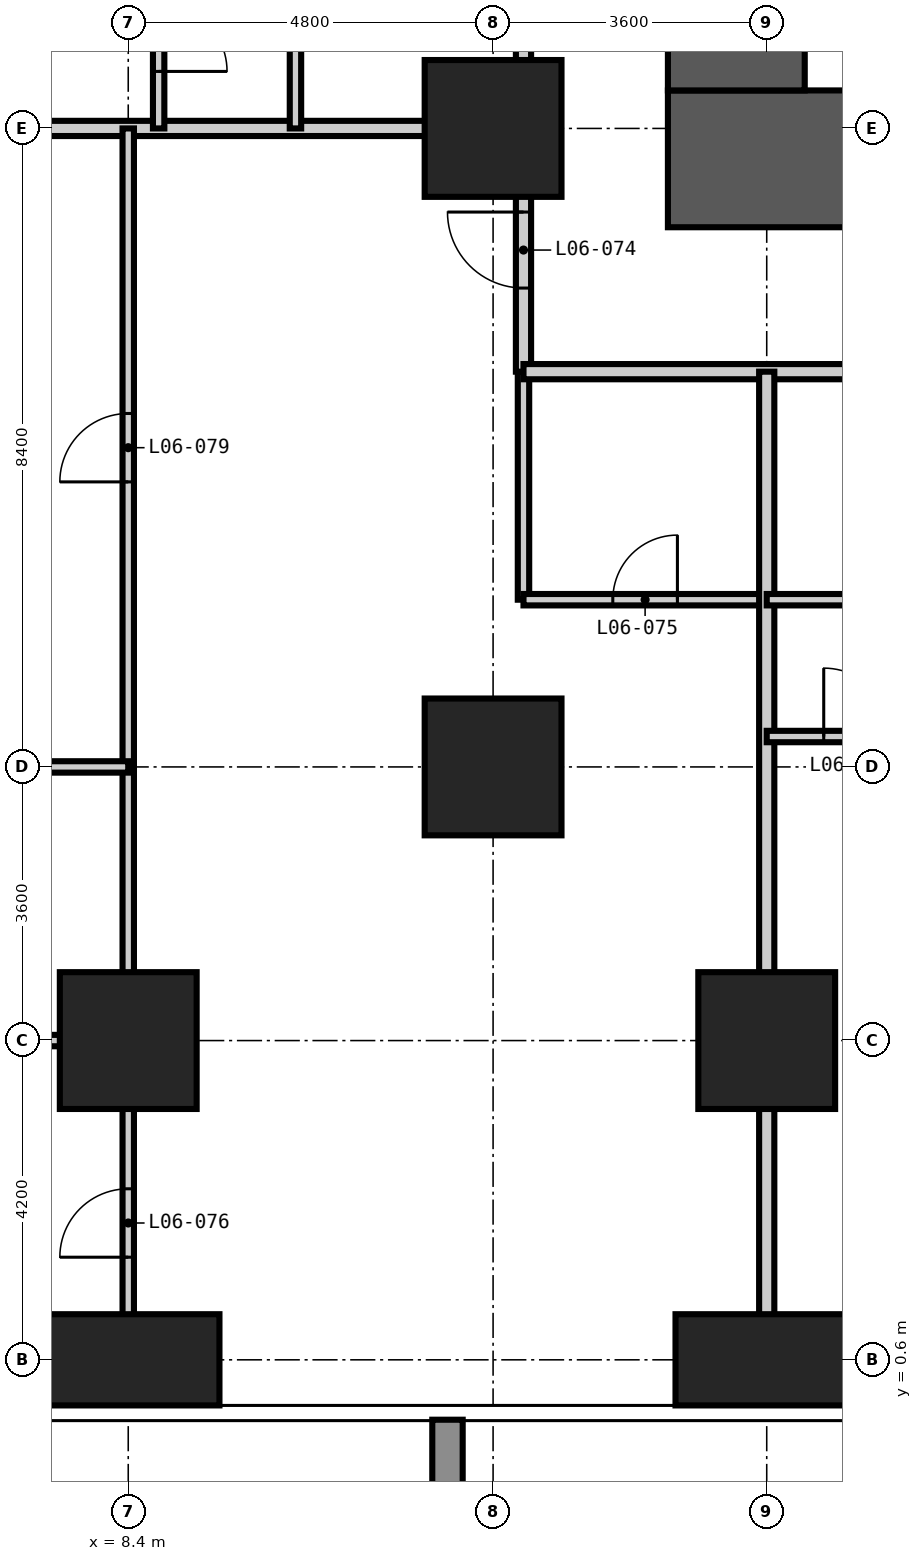
"""IFC4 building model, lengths in metres.
Left out: names, types, materials, properties, quantities, classifications, styles, units other than length and angle.
Written with IfcOpenShell. Run it as: python <this file> out.ifc"""

import sys

from ifc_helpers import new_model, si_unit, direction, frame, frame_2d, origin, origin_2d, place, context, subcontext, project, spatial, rectangle, extrude, element, fill, save


model = new_model("IFC4")
c1 = context("Model", 3, precision=1e-05, world=origin(), true_north=direction((0.0, 1.0)))
c2 = subcontext(c1, "Body", "Model", "MODEL_VIEW")
j1 = project(units=[si_unit("LENGTHUNIT", "METRE"), si_unit("PLANEANGLEUNIT", "RADIAN")], contexts=[c1])
p1 = place(None, origin())
s1 = spatial("IfcSite", under=j1, at=p1, CompositionType="ELEMENT")
p2 = place(p1, origin())
s2 = spatial("IfcBuilding", under=s1, at=p2, CompositionType="ELEMENT")
p3 = place(p2, frame((0.0, 0.0, 30.6)))
s3 = spatial("IfcBuildingStorey", under=s2, at=p3, CompositionType="ELEMENT", Elevation=30.6)
p4 = place(p3, frame((8.4, 0.6, -0.35), z_axis=(0.0, 0.0, 1.0), x_axis=(1.0, 0.0, 0.0)))
e1 = element("IfcColumn", 1, at=p4, inside=s3, PredefinedType="COLUMN", context=c2, shape_type="SweptSolid", body=[
    extrude(rectangle(XDim=2.4, YDim=1.2, at=origin_2d()), origin(), (0.0, 0.0, 1.0), 3.6),
])
for number, where, z_axis, x_axis in (
    (2, (8.4, 4.8, -0.35), (0.0, 0.0, 1.0), (1.0, 0.0, 0.0)),
    (3, (13.2, 8.4, -0.35), (0.0, 0.0, 1.0), (1.0, 0.0, 0.0)),
    (4, (13.2, 16.8, -0.35), (0.0, 0.0, 1.0), (1.0, 0.0, 0.0)),
):
    element("IfcColumn", number, at=place(p3, frame(where, z_axis=z_axis, x_axis=x_axis)), inside=s3, PredefinedType="COLUMN", context=c2, shape_type="SweptSolid", body=[
        extrude(rectangle(XDim=1.8, YDim=1.8, at=origin_2d()), origin(), (0.0, 0.0, 1.0), 3.6),
    ])
p5 = place(p3, frame((16.8, 0.6, -0.35), z_axis=(0.0, 0.0, 1.0), x_axis=(1.0, 0.0, 0.0)))
e5 = element("IfcColumn", 5, at=p5, inside=s3, PredefinedType="COLUMN", context=c2, shape_type="SweptSolid", body=[
    extrude(rectangle(XDim=2.4, YDim=1.2, at=origin_2d()), origin(), (0.0, 0.0, 1.0), 3.6),
])
p6 = place(p3, frame((16.8, 4.8, -0.35), z_axis=(0.0, 0.0, 1.0), x_axis=(1.0, 0.0, 0.0)))
e6 = element("IfcColumn", 6, at=p6, inside=s3, PredefinedType="COLUMN", context=c2, shape_type="SweptSolid", body=[
    extrude(rectangle(XDim=1.8, YDim=1.8, at=origin_2d()), origin(), (0.0, 0.0, 1.0), 3.6),
])
p7 = place(p3, frame((15.5, 16.4, -0.35), z_axis=(0.0, 0.0, 1.0), x_axis=(1.0, 0.0, 0.0)))
e7 = element("IfcWall", 7, at=p7, inside=s3, PredefinedType="SHEAR", context=c2, shape_type="SweptSolid", body=[
    extrude(rectangle(XDim=27.8, YDim=1.8, at=frame_2d((13.9, 0.0))), origin(), (0.0, 0.0, 1.0), 3.6),
])
p8 = place(p7, frame((13.4, 0.0, 0.35)))
e8 = element("IfcOpeningElement", 8, at=p8, cuts=e7, PredefinedType="OPENING", context=c2, shape_type="SweptSolid", body=[
    extrude(rectangle(XDim=1.0, YDim=2.1, at=frame_2d((0.5, 1.05))), frame((0.0, 0.91, 0.0), z_axis=(0.0, -1.0, 0.0), x_axis=(1.0, 0.0, 0.0)), (0.0, 0.0, 1.0), 1.82),
])
p9 = place(p7, frame((19.7, 0.0, 0.35)))
e9 = element("IfcOpeningElement", 9, at=p9, cuts=e7, PredefinedType="OPENING", context=c2, shape_type="SweptSolid", body=[
    extrude(rectangle(XDim=1.0, YDim=2.1, at=frame_2d((0.5, 1.05))), frame((0.0, 0.91, 0.0), z_axis=(0.0, -1.0, 0.0), x_axis=(1.0, 0.0, 0.0)), (0.0, 0.0, 1.0), 1.82),
])
p10 = place(p3, frame((16.4, 41.5, -0.35), z_axis=(0.0, 0.0, 1.0), x_axis=(0.0, -1.0, 0.0)))
e10 = element("IfcWall", 10, at=p10, inside=s3, PredefinedType="SHEAR", context=c2, shape_type="SweptSolid", body=[
    extrude(rectangle(XDim=24.2, YDim=1.8, at=frame_2d((12.1, 0.0))), origin(), (0.0, 0.0, 1.0), 3.6),
])
p11 = place(p10, frame((11.2, 0.0, 0.35)))
e11 = element("IfcOpeningElement", 11, at=p11, cuts=e10, PredefinedType="OPENING", context=c2, shape_type="SweptSolid", body=[
    extrude(rectangle(XDim=1.8, YDim=2.2, at=frame_2d((0.9, 1.1))), frame((0.0, 0.91, 0.0), z_axis=(0.0, -1.0, 0.0), x_axis=(1.0, 0.0, 0.0)), (0.0, 0.0, 1.0), 1.82),
])
p12 = place(p10, frame((20.0, 0.0, 0.35)))
e12 = element("IfcOpeningElement", 12, at=p12, cuts=e10, PredefinedType="OPENING", context=c2, shape_type="SweptSolid", body=[
    extrude(rectangle(XDim=1.0, YDim=2.1, at=frame_2d((0.5, 1.05))), frame((0.0, 0.91, 0.0), z_axis=(0.0, -1.0, 0.0), x_axis=(1.0, 0.0, 0.0)), (0.0, 0.0, 1.0), 1.82),
])
p13 = place(p10, frame((5.3, 0.0, 0.35)))
e13 = element("IfcOpeningElement", 13, at=p13, cuts=e10, PredefinedType="OPENING", context=c2, shape_type="SweptSolid", body=[
    extrude(rectangle(XDim=1.0, YDim=2.1, at=frame_2d((0.5, 1.05))), frame((0.0, 0.91, 0.0), z_axis=(0.0, -1.0, 0.0), x_axis=(1.0, 0.0, 0.0)), (0.0, 0.0, 1.0), 1.82),
])
for number, where, z_axis, x_axis in (
    (14, (13.6, 10.6, 0.0), (0.0, 0.0, 1.0), (0.0, 1.0, 0.0)),
    (15, (5.4, 4.8, 0.0), (0.0, 0.0, 1.0), (1.0, 0.0, 0.0)),
):
    element("IfcWall", number, at=place(p3, frame(where, z_axis=z_axis, x_axis=x_axis)), inside=s3, PredefinedType="PARTITIONING", context=c2, shape_type="SweptSolid", body=[
        extrude(rectangle(XDim=3.0, YDim=0.15, at=frame_2d((1.5, 0.0))), origin(), (0.0, 0.0, 1.0), 3.25),
    ])
p14 = place(p3, frame((13.6, 10.6, 0.0), z_axis=(0.0, 0.0, 1.0), x_axis=(1.0, 0.0, 0.0)))
e16 = element("IfcWall", 16, at=p14, inside=s3, PredefinedType="PARTITIONING", context=c2, shape_type="SweptSolid", body=[
    extrude(rectangle(XDim=3.2, YDim=0.15, at=frame_2d((1.6, 0.0))), origin(), (0.0, 0.0, 1.0), 3.25),
])
p15 = place(p14, frame((1.175, 0.0, 0.0)))
e17 = element("IfcOpeningElement", 17, at=p15, cuts=e16, PredefinedType="OPENING", context=c2, shape_type="SweptSolid", body=[
    extrude(rectangle(XDim=0.85, YDim=2.1, at=frame_2d((0.425, 1.05))), frame((0.0, 0.085, 0.0), z_axis=(0.0, -1.0, 0.0), x_axis=(1.0, 0.0, 0.0)), (0.0, 0.0, 1.0), 0.17),
])
p16 = place(p3, frame((13.6, 13.6, 0.0), z_axis=(0.0, 0.0, 1.0), x_axis=(0.0, 1.0, 0.0)))
e18 = element("IfcWall", 18, at=p16, inside=s3, PredefinedType="PARTITIONING", context=c2, shape_type="SweptSolid", body=[
    extrude(rectangle(XDim=20.0, YDim=0.2, at=frame_2d((10.0, 0.0))), origin(), (0.0, 0.0, 1.0), 3.25),
])
p17 = place(p16, frame((6.0, 0.0, 0.0)))
e19 = element("IfcOpeningElement", 19, at=p17, cuts=e18, PredefinedType="OPENING", context=c2, shape_type="SweptSolid", body=[
    extrude(rectangle(XDim=1.0, YDim=2.2, at=frame_2d((0.5, 1.1))), frame((0.0, 0.11, 0.0), z_axis=(0.0, -1.0, 0.0), x_axis=(1.0, 0.0, 0.0)), (0.0, 0.0, 1.0), 0.22),
])
p18 = place(p16, frame((7.8, 0.0, 0.0)))
e20 = element("IfcOpeningElement", 20, at=p18, cuts=e18, PredefinedType="OPENING", context=c2, shape_type="SweptSolid", body=[
    extrude(rectangle(XDim=1.0, YDim=2.2, at=frame_2d((0.5, 1.1))), frame((0.0, 0.11, 0.0), z_axis=(0.0, -1.0, 0.0), x_axis=(1.0, 0.0, 0.0)), (0.0, 0.0, 1.0), 0.22),
])
p19 = place(p16, frame((14.4, 0.0, 0.0)))
e21 = element("IfcOpeningElement", 21, at=p19, cuts=e18, PredefinedType="OPENING", context=c2, shape_type="SweptSolid", body=[
    extrude(rectangle(XDim=1.0, YDim=2.2, at=frame_2d((0.5, 1.1))), frame((0.0, 0.11, 0.0), z_axis=(0.0, -1.0, 0.0), x_axis=(1.0, 0.0, 0.0)), (0.0, 0.0, 1.0), 0.22),
])
p20 = place(p16, frame((16.2, 0.0, 0.0)))
e22 = element("IfcOpeningElement", 22, at=p20, cuts=e18, PredefinedType="OPENING", context=c2, shape_type="SweptSolid", body=[
    extrude(rectangle(XDim=1.0, YDim=2.2, at=frame_2d((0.5, 1.1))), frame((0.0, 0.11, 0.0), z_axis=(0.0, -1.0, 0.0), x_axis=(1.0, 0.0, 0.0)), (0.0, 0.0, 1.0), 0.22),
])
p21 = place(p16, frame((1.1, 0.0, 0.0)))
e23 = element("IfcOpeningElement", 23, at=p21, cuts=e18, PredefinedType="OPENING", context=c2, shape_type="SweptSolid", body=[
    extrude(rectangle(XDim=1.0, YDim=2.2, at=frame_2d((0.5, 1.1))), frame((0.0, 0.11, 0.0), z_axis=(0.0, -1.0, 0.0), x_axis=(1.0, 0.0, 0.0)), (0.0, 0.0, 1.0), 0.22),
])
p22 = place(p3, frame((45.5, 13.6, 0.0), z_axis=(0.0, 0.0, 1.0), x_axis=(-1.0, 0.0, 0.0)))
e24 = element("IfcWall", 24, at=p22, inside=s3, PredefinedType="PARTITIONING", context=c2, shape_type="SweptSolid", body=[
    extrude(rectangle(XDim=31.9, YDim=0.2, at=frame_2d((15.95, 0.0))), origin(), (0.0, 0.0, 1.0), 3.25),
])
p23 = place(p22, frame((24.9, 0.0, 0.0)))
e25 = element("IfcOpeningElement", 25, at=p23, cuts=e24, PredefinedType="OPENING", context=c2, shape_type="SweptSolid", body=[
    extrude(rectangle(XDim=1.0, YDim=2.2, at=frame_2d((0.5, 1.1))), frame((0.0, 0.11, 0.0), z_axis=(0.0, -1.0, 0.0), x_axis=(1.0, 0.0, 0.0)), (0.0, 0.0, 1.0), 0.22),
])
p24 = place(p22, frame((23.1, 0.0, 0.0)))
e26 = element("IfcOpeningElement", 26, at=p24, cuts=e24, PredefinedType="OPENING", context=c2, shape_type="SweptSolid", body=[
    extrude(rectangle(XDim=1.0, YDim=2.2, at=frame_2d((0.5, 1.1))), frame((0.0, 0.11, 0.0), z_axis=(0.0, -1.0, 0.0), x_axis=(1.0, 0.0, 0.0)), (0.0, 0.0, 1.0), 0.22),
])
p25 = place(p22, frame((16.5, 0.0, 0.0)))
e27 = element("IfcOpeningElement", 27, at=p25, cuts=e24, PredefinedType="OPENING", context=c2, shape_type="SweptSolid", body=[
    extrude(rectangle(XDim=1.0, YDim=2.2, at=frame_2d((0.5, 1.1))), frame((0.0, 0.11, 0.0), z_axis=(0.0, -1.0, 0.0), x_axis=(1.0, 0.0, 0.0)), (0.0, 0.0, 1.0), 0.22),
])
p26 = place(p22, frame((14.7, 0.0, 0.0)))
e28 = element("IfcOpeningElement", 28, at=p26, cuts=e24, PredefinedType="OPENING", context=c2, shape_type="SweptSolid", body=[
    extrude(rectangle(XDim=1.0, YDim=2.2, at=frame_2d((0.5, 1.1))), frame((0.0, 0.11, 0.0), z_axis=(0.0, -1.0, 0.0), x_axis=(1.0, 0.0, 0.0)), (0.0, 0.0, 1.0), 0.22),
])
p27 = place(p22, frame((8.1, 0.0, 0.0)))
e29 = element("IfcOpeningElement", 29, at=p27, cuts=e24, PredefinedType="OPENING", context=c2, shape_type="SweptSolid", body=[
    extrude(rectangle(XDim=1.0, YDim=2.2, at=frame_2d((0.5, 1.1))), frame((0.0, 0.11, 0.0), z_axis=(0.0, -1.0, 0.0), x_axis=(1.0, 0.0, 0.0)), (0.0, 0.0, 1.0), 0.22),
])
p28 = place(p22, frame((6.3, 0.0, 0.0)))
e30 = element("IfcOpeningElement", 30, at=p28, cuts=e24, PredefinedType="OPENING", context=c2, shape_type="SweptSolid", body=[
    extrude(rectangle(XDim=1.0, YDim=2.2, at=frame_2d((0.5, 1.1))), frame((0.0, 0.11, 0.0), z_axis=(0.0, -1.0, 0.0), x_axis=(1.0, 0.0, 0.0)), (0.0, 0.0, 1.0), 0.22),
])
for number, where, z_axis, x_axis in (
    (31, (16.8, -0.008, 0.0), (0.0, 0.0, 1.0), (0.0, 1.0, 0.0)),
    (32, (-0.008, 16.8, 0.0), (0.0, 0.0, 1.0), (1.0, 0.0, 0.0)),
):
    element("IfcWall", number, at=place(p3, frame(where, z_axis=z_axis, x_axis=x_axis)), inside=s3, PredefinedType="PARTITIONING", context=c2, shape_type="SweptSolid", body=[
        extrude(rectangle(XDim=13.608, YDim=0.2, at=frame_2d((6.804, 0.0))), origin(), (0.0, 0.0, 1.0), 3.25),
    ])
p29 = place(p3, frame((8.4, -0.008, 0.0), z_axis=(0.0, 0.0, 1.0), x_axis=(0.0, 1.0, 0.0)))
e33 = element("IfcWall", 33, at=p29, inside=s3, PredefinedType="PARTITIONING", context=c2, shape_type="SweptSolid", body=[
    extrude(rectangle(XDim=16.808, YDim=0.15, at=frame_2d((8.404, 0.0))), origin(), (0.0, 0.0, 1.0), 3.25),
])
p30 = place(p29, frame((1.958, 0.0, 0.0)))
e34 = element("IfcOpeningElement", 34, at=p30, cuts=e33, PredefinedType="OPENING", context=c2, shape_type="SweptSolid", body=[
    extrude(rectangle(XDim=0.9, YDim=2.1, at=frame_2d((0.45, 1.05))), frame((0.0, 0.085, 0.0), z_axis=(0.0, -1.0, 0.0), x_axis=(1.0, 0.0, 0.0)), (0.0, 0.0, 1.0), 0.17),
])
p31 = place(p29, frame((12.158, 0.0, 0.0)))
e35 = element("IfcOpeningElement", 35, at=p31, cuts=e33, PredefinedType="OPENING", context=c2, shape_type="SweptSolid", body=[
    extrude(rectangle(XDim=0.9, YDim=2.1, at=frame_2d((0.45, 1.05))), frame((0.0, 0.085, 0.0), z_axis=(0.0, -1.0, 0.0), x_axis=(1.0, 0.0, 0.0)), (0.0, 0.0, 1.0), 0.17),
])
p32 = place(p3, frame((8.8, 16.8, 0.0), z_axis=(0.0, 0.0, 1.0), x_axis=(0.0, 1.0, 0.0)))
e36 = element("IfcWall", 36, at=p32, inside=s3, PredefinedType="PARTITIONING", context=c2, shape_type="SweptSolid", body=[
    extrude(rectangle(XDim=2.4, YDim=0.15, at=frame_2d((1.2, 0.0))), origin(), (0.0, 0.0, 1.0), 3.25),
])
p33 = place(p32, frame((0.75, 0.0, 0.0)))
e37 = element("IfcOpeningElement", 37, at=p33, cuts=e36, PredefinedType="OPENING", context=c2, shape_type="SweptSolid", body=[
    extrude(rectangle(XDim=0.9, YDim=2.1, at=frame_2d((0.45, 1.05))), frame((0.0, 0.085, 0.0), z_axis=(0.0, -1.0, 0.0), x_axis=(1.0, 0.0, 0.0)), (0.0, 0.0, 1.0), 0.17),
])
p34 = place(p3, frame((10.6, 16.8, 0.0), z_axis=(0.0, 0.0, 1.0), x_axis=(0.0, 1.0, 0.0)))
e38 = element("IfcWall", 38, at=p34, inside=s3, PredefinedType="PARTITIONING", context=c2, shape_type="SweptSolid", body=[
    extrude(rectangle(XDim=2.4, YDim=0.15, at=frame_2d((1.2, 0.0))), origin(), (0.0, 0.0, 1.0), 3.25),
])
p35 = place(p3, frame((-0.008, 8.4, 0.0), z_axis=(0.0, 0.0, 1.0), x_axis=(1.0, 0.0, 0.0)))
e39 = element("IfcWall", 39, at=p35, inside=s3, PredefinedType="PARTITIONING", context=c2, shape_type="SweptSolid", body=[
    extrude(rectangle(XDim=8.408, YDim=0.15, at=frame_2d((4.204, 0.0))), origin(), (0.0, 0.0, 1.0), 3.25),
])
p36 = place(p35, frame((2.958, 0.0, 0.0)))
e40 = element("IfcOpeningElement", 40, at=p36, cuts=e39, PredefinedType="OPENING", context=c2, shape_type="SweptSolid", body=[
    extrude(rectangle(XDim=0.9, YDim=2.1, at=frame_2d((0.45, 1.05))), frame((0.0, 0.085, 0.0), z_axis=(0.0, -1.0, 0.0), x_axis=(1.0, 0.0, 0.0)), (0.0, 0.0, 1.0), 0.17),
])
p37 = place(p3, frame((16.8, 8.8, 0.0), z_axis=(0.0, 0.0, 1.0), x_axis=(1.0, 0.0, 0.0)))
e41 = element("IfcWall", 41, at=p37, inside=s3, PredefinedType="PARTITIONING", context=c2, shape_type="SweptSolid", body=[
    extrude(rectangle(XDim=2.4, YDim=0.15, at=frame_2d((1.2, 0.0))), origin(), (0.0, 0.0, 1.0), 3.25),
])
p38 = place(p37, frame((0.75, 0.0, 0.0)))
e42 = element("IfcOpeningElement", 42, at=p38, cuts=e41, PredefinedType="OPENING", context=c2, shape_type="SweptSolid", body=[
    extrude(rectangle(XDim=0.9, YDim=2.1, at=frame_2d((0.45, 1.05))), frame((0.0, 0.085, 0.0), z_axis=(0.0, -1.0, 0.0), x_axis=(1.0, 0.0, 0.0)), (0.0, 0.0, 1.0), 0.17),
])
p39 = place(p3, frame((16.8, 10.6, 0.0), z_axis=(0.0, 0.0, 1.0), x_axis=(1.0, 0.0, 0.0)))
e43 = element("IfcWall", 43, at=p39, inside=s3, PredefinedType="PARTITIONING", context=c2, shape_type="SweptSolid", body=[
    extrude(rectangle(XDim=2.4, YDim=0.15, at=frame_2d((1.2, 0.0))), origin(), (0.0, 0.0, 1.0), 3.25),
])
p40 = place(p38, origin())
e44 = element("IfcDoor", 44, at=p40, inside=s3, OperationType="SINGLE_SWING_LEFT", PredefinedType="DOOR", context=c2, shape_type="SweptSolid", body=[
    extrude(rectangle(XDim=0.9, YDim=2.1, at=frame_2d((0.45, 1.05))), frame((0.0, 0.025, 0.0), z_axis=(0.0, -1.0, 0.0), x_axis=(1.0, 0.0, 0.0)), (0.0, 0.0, 1.0), 0.05),
])
fill(e42, e44)
p41 = place(p33, frame((0.9, 0.0, 0.0), z_axis=(0.0, 0.0, 1.0), x_axis=(-1.0, 0.0, 0.0)))
e45 = element("IfcDoor", 45, at=p41, inside=s3, OperationType="SINGLE_SWING_RIGHT", PredefinedType="DOOR", context=c2, shape_type="SweptSolid", body=[
    extrude(rectangle(XDim=0.9, YDim=2.1, at=frame_2d((0.45, 1.05))), frame((0.0, 0.025, 0.0), z_axis=(0.0, -1.0, 0.0), x_axis=(1.0, 0.0, 0.0)), (0.0, 0.0, 1.0), 0.05),
])
fill(e37, e45)
p42 = place(p21, origin())
e46 = element("IfcDoor", 46, at=p42, inside=s3, OperationType="SINGLE_SWING_RIGHT", PredefinedType="DOOR", context=c2, shape_type="SweptSolid", body=[
    extrude(rectangle(XDim=1.0, YDim=2.2, at=frame_2d((0.5, 1.1))), frame((0.0, 0.025, 0.0), z_axis=(0.0, -1.0, 0.0), x_axis=(1.0, 0.0, 0.0)), (0.0, 0.0, 1.0), 0.05),
])
fill(e23, e46)
p43 = place(p15, origin())
e47 = element("IfcDoor", 47, at=p43, inside=s3, OperationType="SINGLE_SWING_RIGHT", PredefinedType="DOOR", context=c2, shape_type="SweptSolid", body=[
    extrude(rectangle(XDim=0.85, YDim=2.1, at=frame_2d((0.425, 1.05))), frame((0.0, 0.025, 0.0), z_axis=(0.0, -1.0, 0.0), x_axis=(1.0, 0.0, 0.0)), (0.0, 0.0, 1.0), 0.05),
])
fill(e17, e47)
p44 = place(p30, origin())
e48 = element("IfcDoor", 48, at=p44, inside=s3, OperationType="SINGLE_SWING_LEFT", PredefinedType="DOOR", context=c2, shape_type="SweptSolid", body=[
    extrude(rectangle(XDim=0.9, YDim=2.1, at=frame_2d((0.45, 1.05))), frame((0.0, 0.025, 0.0), z_axis=(0.0, -1.0, 0.0), x_axis=(1.0, 0.0, 0.0)), (0.0, 0.0, 1.0), 0.05),
])
fill(e34, e48)
p45 = place(p31, origin())
e49 = element("IfcDoor", 49, at=p45, inside=s3, OperationType="SINGLE_SWING_LEFT", PredefinedType="DOOR", context=c2, shape_type="SweptSolid", body=[
    extrude(rectangle(XDim=0.9, YDim=2.1, at=frame_2d((0.45, 1.05))), frame((0.0, 0.025, 0.0), z_axis=(0.0, -1.0, 0.0), x_axis=(1.0, 0.0, 0.0)), (0.0, 0.0, 1.0), 0.05),
])
fill(e35, e49)
save(model, sys.argv[1])
